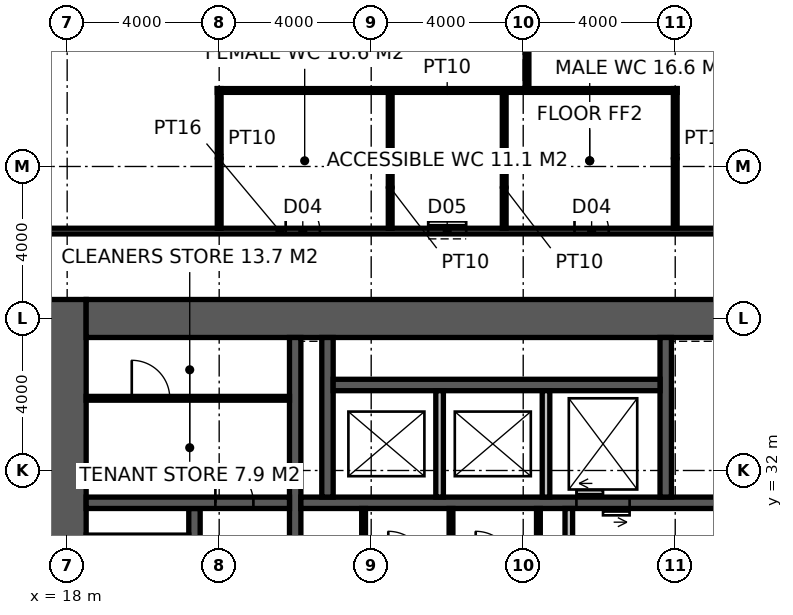
"""IFC4 building model, lengths in metres.
Left out: names, types, materials, properties, quantities, classifications, styles, units other than length and angle.
Written with IfcOpenShell. Run it as: python <this file> out.ifc"""

import sys

from ifc_helpers import new_model, si_unit, direction, frame, frame_2d, origin, place, context, subcontext, project, spatial, rectangle, extrude, element, fill, save


model = new_model("IFC4")
c1 = context("Model", 3, precision=1e-05, world=origin(), true_north=direction((0.0, 1.0)))
c2 = subcontext(c1, "Body", "Model", "MODEL_VIEW")
j1 = project(units=[si_unit("LENGTHUNIT", "METRE"), si_unit("PLANEANGLEUNIT", "RADIAN")], contexts=[c1])
p1 = place(None, origin())
s1 = spatial("IfcSite", under=j1, at=p1, CompositionType="ELEMENT")
p2 = place(p1, origin())
s2 = spatial("IfcBuilding", under=s1, at=p2, CompositionType="ELEMENT")
p3 = place(p2, frame((0.0, 0.0, 199.8)))
s3 = spatial("IfcBuildingStorey", under=s2, at=p3, CompositionType="ELEMENT", Elevation=199.8)
p4 = place(p3, frame((18.0, 17.5, -0.15), z_axis=(0.0, 0.0, 1.0), x_axis=(0.0, 1.0, 0.0)))
e1 = element("IfcWall", 1, at=p4, inside=s3, PredefinedType="SHEAR", context=c2, shape_type="SweptSolid", body=[
    extrude(rectangle(XDim=19.0, YDim=1.0, at=frame_2d((9.5, 0.0))), origin(), (0.0, 0.0, 1.0), 4.0),
])
p5 = place(p3, frame((18.5, 36.0, -0.15), z_axis=(0.0, 0.0, 1.0), x_axis=(1.0, 0.0, 0.0)))
e2 = element("IfcWall", 2, at=p5, inside=s3, PredefinedType="SHEAR", context=c2, shape_type="SweptSolid", body=[
    extrude(rectangle(XDim=17.6, YDim=1.0, at=frame_2d((8.8, 0.0))), origin(), (0.0, 0.0, 1.0), 4.0),
])
p6 = place(p3, frame((24.0, 18.5, -0.15), z_axis=(0.0, 0.0, 1.0), x_axis=(0.0, 1.0, 0.0)))
e3 = element("IfcWall", 3, at=p6, inside=s3, PredefinedType="SHEAR", context=c2, shape_type="SweptSolid", body=[
    extrude(rectangle(XDim=17.0, YDim=0.3, at=frame_2d((8.5, 0.0))), origin(), (0.0, 0.0, 1.0), 4.0),
])
p7 = place(p6, frame((9.6, 0.0, 0.15)))
e4 = element("IfcOpeningElement", 4, at=p7, cuts=e3, PredefinedType="OPENING", context=c2, shape_type="SweptSolid", body=[
    extrude(rectangle(XDim=1.5, YDim=2.4, at=frame_2d((0.75, 1.2))), frame((0.0, 0.16, 0.0), z_axis=(0.0, -1.0, 0.0), x_axis=(1.0, 0.0, 0.0)), (0.0, 0.0, 1.0), 0.32),
])
p8 = place(p3, frame((24.15, 31.15, -0.15), z_axis=(0.0, 0.0, 1.0), x_axis=(1.0, 0.0, 0.0)))
e5 = element("IfcWall", 5, at=p8, inside=s3, PredefinedType="SHEAR", context=c2, shape_type="SweptSolid", body=[
    extrude(rectangle(XDim=11.25, YDim=0.3, at=frame_2d((5.625, 0.0))), origin(), (0.0, 0.0, 1.0), 4.0),
])
p9 = place(p8, frame((7.25, 0.0, 0.15)))
e6 = element("IfcOpeningElement", 6, at=p9, cuts=e5, PredefinedType="OPENING", context=c2, shape_type="SweptSolid", body=[
    extrude(rectangle(XDim=1.4, YDim=2.4, at=frame_2d((0.7, 1.2))), frame((0.0, 0.16, 0.0), z_axis=(0.0, -1.0, 0.0), x_axis=(1.0, 0.0, 0.0)), (0.0, 0.0, 1.0), 0.32),
])
p10 = place(p3, frame((21.35, 18.5, -0.15), z_axis=(0.0, 0.0, 1.0), x_axis=(0.0, 1.0, 0.0)))
e7 = element("IfcWall", 7, at=p10, inside=s3, PredefinedType="SHEAR", context=c2, shape_type="SweptSolid", body=[
    extrude(rectangle(XDim=12.5, YDim=0.3, at=frame_2d((6.25, 0.0))), origin(), (0.0, 0.0, 1.0), 4.0),
])
p11 = place(p10, frame((0.875, 0.0, 0.15)))
e8 = element("IfcOpeningElement", 8, at=p11, cuts=e7, PredefinedType="OPENING", context=c2, shape_type="SweptSolid", body=[
    extrude(rectangle(XDim=1.1, YDim=2.2, at=frame_2d((0.55, 1.1))), frame((0.0, 0.16, 0.0), z_axis=(0.0, -1.0, 0.0), x_axis=(1.0, 0.0, 0.0)), (0.0, 0.0, 1.0), 0.32),
])
p12 = place(p10, frame((3.825, 0.0, 0.15)))
e9 = element("IfcOpeningElement", 9, at=p12, cuts=e7, PredefinedType="OPENING", context=c2, shape_type="SweptSolid", body=[
    extrude(rectangle(XDim=1.1, YDim=2.2, at=frame_2d((0.55, 1.1))), frame((0.0, 0.16, 0.0), z_axis=(0.0, -1.0, 0.0), x_axis=(1.0, 0.0, 0.0)), (0.0, 0.0, 1.0), 0.32),
])
p13 = place(p10, frame((6.675, 0.0, 0.15)))
e10 = element("IfcOpeningElement", 10, at=p13, cuts=e7, PredefinedType="OPENING", context=c2, shape_type="SweptSolid", body=[
    extrude(rectangle(XDim=1.1, YDim=2.2, at=frame_2d((0.55, 1.1))), frame((0.0, 0.16, 0.0), z_axis=(0.0, -1.0, 0.0), x_axis=(1.0, 0.0, 0.0)), (0.0, 0.0, 1.0), 0.32),
])
p14 = place(p10, frame((9.575, 0.0, 0.15)))
e11 = element("IfcOpeningElement", 11, at=p14, cuts=e7, PredefinedType="OPENING", context=c2, shape_type="SweptSolid", body=[
    extrude(rectangle(XDim=1.1, YDim=2.2, at=frame_2d((0.55, 1.1))), frame((0.0, 0.16, 0.0), z_axis=(0.0, -1.0, 0.0), x_axis=(1.0, 0.0, 0.0)), (0.0, 0.0, 1.0), 0.32),
])
p15 = place(p3, frame((18.5, 31.15, -0.15), z_axis=(0.0, 0.0, 1.0), x_axis=(1.0, 0.0, 0.0)))
e12 = element("IfcWall", 12, at=p15, inside=s3, PredefinedType="SHEAR", context=c2, shape_type="SweptSolid", body=[
    extrude(rectangle(XDim=5.35, YDim=0.3, at=frame_2d((2.675, 0.0))), origin(), (0.0, 0.0, 1.0), 4.0),
])
p16 = place(p15, frame((3.4, 0.0, 0.15)))
e13 = element("IfcOpeningElement", 13, at=p16, cuts=e12, PredefinedType="OPENING", context=c2, shape_type="SweptSolid", body=[
    extrude(rectangle(XDim=1.0, YDim=2.2, at=frame_2d((0.5, 1.1))), frame((0.0, 0.16, 0.0), z_axis=(0.0, -1.0, 0.0), x_axis=(1.0, 0.0, 0.0)), (0.0, 0.0, 1.0), 0.32),
])
for number, where, z_axis, x_axis in (
    (14, (24.85, 31.3, -0.15), (0.0, 0.0, 1.0), (0.0, 1.0, 0.0)),
    (15, (33.75, 31.3, -0.15), (0.0, 0.0, 1.0), (0.0, 1.0, 0.0)),
):
    element("IfcWall", number, at=place(p3, frame(where, z_axis=z_axis, x_axis=x_axis)), inside=s3, PredefinedType="SHEAR", context=c2, shape_type="SweptSolid", body=[
        extrude(rectangle(XDim=4.2, YDim=0.3, at=frame_2d((2.1, 0.0))), origin(), (0.0, 0.0, 1.0), 4.0),
    ])
p17 = place(p3, frame((25.0, 34.25, -0.15), z_axis=(0.0, 0.0, 1.0), x_axis=(1.0, 0.0, 0.0)))
e16 = element("IfcWall", 16, at=p17, inside=s3, PredefinedType="SHEAR", context=c2, shape_type="SweptSolid", body=[
    extrude(rectangle(XDim=8.6, YDim=0.3, at=frame_2d((4.3, 0.0))), origin(), (0.0, 0.0, 1.0), 4.0),
])
for number, where, z_axis, x_axis in (
    (17, (27.8, 31.3, -0.15), (0.0, 0.0, 1.0), (0.0, 1.0, 0.0)),
    (18, (30.6, 31.3, -0.15), (0.0, 0.0, 1.0), (0.0, 1.0, 0.0)),
):
    element("IfcWall", number, at=place(p3, frame(where, z_axis=z_axis, x_axis=x_axis)), inside=s3, PredefinedType="SOLIDWALL", context=c2, shape_type="SweptSolid", body=[
        extrude(rectangle(XDim=2.8, YDim=0.2, at=frame_2d((1.4, 0.0))), origin(), (0.0, 0.0, 1.0), 4.0),
    ])
p18 = place(p3, frame((31.2, 26.7, 0.0), z_axis=(0.0, 0.0, 1.0), x_axis=(0.0, 1.0, 0.0)))
e19 = element("IfcWall", 19, at=p18, inside=s3, PredefinedType="SOLIDWALL", context=c2, shape_type="SweptSolid", body=[
    extrude(rectangle(XDim=4.3, YDim=0.2, at=frame_2d((2.15, 0.0))), origin(), (0.0, 0.0, 1.0), 3.85),
])
p19 = place(p3, frame((18.5, 33.9, 0.0), z_axis=(0.0, 0.0, 1.0), x_axis=(1.0, 0.0, 0.0)))
e20 = element("IfcWall", 20, at=p19, inside=s3, PredefinedType="PARTITIONING", context=c2, shape_type="SweptSolid", body=[
    extrude(rectangle(XDim=5.35, YDim=0.1, at=frame_2d((2.675, 0.0))), origin(), (0.0, 0.0, 1.0), 3.85),
])
p20 = place(p19, frame((1.2, 0.0, 0.0)))
e21 = element("IfcOpeningElement", 21, at=p20, cuts=e20, PredefinedType="OPENING", context=c2, shape_type="SweptSolid", body=[
    extrude(rectangle(XDim=1.0, YDim=2.2, at=frame_2d((0.5, 1.1))), frame((0.0, 0.06, 0.0), z_axis=(0.0, -1.0, 0.0), x_axis=(1.0, 0.0, 0.0)), (0.0, 0.0, 1.0), 0.12),
])
for number, where, z_axis, x_axis in (
    (22, (25.8, 29.45, 0.0), (0.0, 0.0, 1.0), (0.0, 1.0, 0.0)),
    (23, (30.4, 29.45, 0.0), (0.0, 0.0, 1.0), (0.0, 1.0, 0.0)),
    (24, (28.1, 29.45, 0.0), (0.0, 0.0, 1.0), (0.0, 1.0, 0.0)),
):
    element("IfcWall", number, at=place(p3, frame(where, z_axis=z_axis, x_axis=x_axis)), inside=s3, PredefinedType="PARTITIONING", context=c2, shape_type="SweptSolid", body=[
        extrude(rectangle(XDim=1.55, YDim=0.1, at=frame_2d((0.775, 0.0))), origin(), (0.0, 0.0, 1.0), 3.85),
    ])
p21 = place(p3, frame((17.5, 38.3, 0.0), z_axis=(0.0, 0.0, 1.0), x_axis=(1.0, 0.0, 0.0)))
e25 = element("IfcWall", 25, at=p21, inside=s3, PredefinedType="PARTITIONING", context=c2, shape_type="SweptSolid", body=[
    extrude(rectangle(XDim=20.325, YDim=0.15, at=frame_2d((10.163, 0.0))), origin(), (0.0, 0.0, 1.0), 3.85),
])
p22 = place(p21, frame((6.25, 0.0, 0.0)))
e26 = element("IfcOpeningElement", 26, at=p22, cuts=e25, PredefinedType="OPENING", context=c2, shape_type="SweptSolid", body=[
    extrude(rectangle(XDim=0.9, YDim=2.1, at=frame_2d((0.45, 1.05))), frame((0.0, 0.085, 0.0), z_axis=(0.0, -1.0, 0.0), x_axis=(1.0, 0.0, 0.0)), (0.0, 0.0, 1.0), 0.17),
])
p23 = place(p21, frame((10.0, 0.0, 0.0)))
e27 = element("IfcOpeningElement", 27, at=p23, cuts=e25, PredefinedType="OPENING", context=c2, shape_type="SweptSolid", body=[
    extrude(rectangle(XDim=1.0, YDim=2.1, at=frame_2d((0.5, 1.05))), frame((0.0, 0.085, 0.0), z_axis=(0.0, -1.0, 0.0), x_axis=(1.0, 0.0, 0.0)), (0.0, 0.0, 1.0), 0.17),
])
p24 = place(p21, frame((13.85, 0.0, 0.0)))
e28 = element("IfcOpeningElement", 28, at=p24, cuts=e25, PredefinedType="OPENING", context=c2, shape_type="SweptSolid", body=[
    extrude(rectangle(XDim=0.9, YDim=2.1, at=frame_2d((0.45, 1.05))), frame((0.0, 0.085, 0.0), z_axis=(0.0, -1.0, 0.0), x_axis=(1.0, 0.0, 0.0)), (0.0, 0.0, 1.0), 0.17),
])
for number, where, z_axis, x_axis in (
    (29, (22.0, 38.375, 0.0), (0.0, 0.0, 1.0), (0.0, 1.0, 0.0)),
    (30, (34.0, 38.375, 0.0), (0.0, 0.0, 1.0), (0.0, 1.0, 0.0)),
):
    element("IfcWall", number, at=place(p3, frame(where, z_axis=z_axis, x_axis=x_axis)), inside=s3, PredefinedType="PARTITIONING", context=c2, shape_type="SweptSolid", body=[
        extrude(rectangle(XDim=3.675, YDim=0.1, at=frame_2d((1.837, 0.0))), origin(), (0.0, 0.0, 1.0), 2.85),
    ])
p25 = place(p3, frame((21.95, 42.0, 0.0), z_axis=(0.0, 0.0, 1.0), x_axis=(1.0, 0.0, 0.0)))
e31 = element("IfcWall", 31, at=p25, inside=s3, PredefinedType="PARTITIONING", context=c2, shape_type="SweptSolid", body=[
    extrude(rectangle(XDim=12.1, YDim=0.1, at=frame_2d((6.05, 0.0))), origin(), (0.0, 0.0, 1.0), 3.85),
])
for number, where, z_axis, x_axis in (
    (32, (26.5, 38.375, 0.0), (0.0, 0.0, 1.0), (0.0, 1.0, 0.0)),
    (33, (29.5, 38.375, 0.0), (0.0, 0.0, 1.0), (0.0, 1.0, 0.0)),
):
    element("IfcWall", number, at=place(p3, frame(where, z_axis=z_axis, x_axis=x_axis)), inside=s3, PredefinedType="PARTITIONING", context=c2, shape_type="SweptSolid", body=[
        extrude(rectangle(XDim=3.575, YDim=0.1, at=frame_2d((1.788, 0.0))), origin(), (0.0, 0.0, 1.0), 2.65),
    ])
p26 = place(p3, frame((30.1, 55.7, 0.0), z_axis=(0.0, 0.0, 1.0), x_axis=(0.0, -1.0, 0.0)))
e34 = element("IfcWall", 34, at=p26, inside=s3, PredefinedType="PARTITIONING", context=c2, shape_type="SweptSolid", body=[
    extrude(rectangle(XDim=13.7, YDim=0.1, at=frame_2d((6.85, 0.0))), origin(), (0.0, 0.0, 1.0), 2.65),
])
p27 = place(p26, frame((6.35, 0.0, 0.0)))
e35 = element("IfcOpeningElement", 35, at=p27, cuts=e34, PredefinedType="OPENING", context=c2, shape_type="SweptSolid", body=[
    extrude(rectangle(XDim=1.0, YDim=2.2, at=frame_2d((0.5, 1.1))), frame((0.0, 0.06, 0.0), z_axis=(0.0, -1.0, 0.0), x_axis=(1.0, 0.0, 0.0)), (0.0, 0.0, 1.0), 0.12),
])
p28 = place(p16, origin())
e36 = element("IfcDoor", 36, at=p28, inside=s3, OperationType="SINGLE_SWING_LEFT", PredefinedType="DOOR", context=c2, shape_type="SweptSolid", body=[
    extrude(rectangle(XDim=1.0, YDim=2.2, at=frame_2d((0.5, 1.1))), frame((0.0, 0.025, 0.0), z_axis=(0.0, -1.0, 0.0), x_axis=(1.0, 0.0, 0.0)), (0.0, 0.0, 1.0), 0.05),
])
fill(e13, e36)
p29 = place(p20, origin())
e37 = element("IfcDoor", 37, at=p29, inside=s3, OperationType="SINGLE_SWING_LEFT", PredefinedType="DOOR", context=c2, shape_type="SweptSolid", body=[
    extrude(rectangle(XDim=1.0, YDim=2.2, at=frame_2d((0.5, 1.1))), frame((0.0, 0.025, 0.0), z_axis=(0.0, -1.0, 0.0), x_axis=(1.0, 0.0, 0.0)), (0.0, 0.0, 1.0), 0.05),
])
fill(e21, e37)
p30 = place(p22, origin())
e38 = element("IfcDoor", 38, at=p30, inside=s3, OperationType="SINGLE_SWING_LEFT", PredefinedType="DOOR", context=c2, shape_type="SweptSolid", body=[
    extrude(rectangle(XDim=0.9, YDim=2.1, at=frame_2d((0.45, 1.05))), frame((0.0, 0.025, 0.0), z_axis=(0.0, -1.0, 0.0), x_axis=(1.0, 0.0, 0.0)), (0.0, 0.0, 1.0), 0.05),
])
fill(e26, e38)
p31 = place(p23, origin())
e39 = element("IfcDoor", 39, at=p31, inside=s3, OperationType="SLIDING_TO_LEFT", PredefinedType="DOOR", context=c2, shape_type="SweptSolid", body=[
    extrude(rectangle(XDim=1.0, YDim=2.1, at=frame_2d((0.5, 1.05))), frame((0.0, 0.025, 0.0), z_axis=(0.0, -1.0, 0.0), x_axis=(1.0, 0.0, 0.0)), (0.0, 0.0, 1.0), 0.05),
])
fill(e27, e39)
p32 = place(p24, origin())
e40 = element("IfcDoor", 40, at=p32, inside=s3, OperationType="SINGLE_SWING_LEFT", PredefinedType="DOOR", context=c2, shape_type="SweptSolid", body=[
    extrude(rectangle(XDim=0.9, YDim=2.1, at=frame_2d((0.45, 1.05))), frame((0.0, 0.025, 0.0), z_axis=(0.0, -1.0, 0.0), x_axis=(1.0, 0.0, 0.0)), (0.0, 0.0, 1.0), 0.05),
])
fill(e28, e40)
p33 = place(p9, origin())
e41 = element("IfcDoor", 41, at=p33, inside=s3, OperationType="DOUBLE_DOOR_SLIDING", PredefinedType="DOOR", context=c2, shape_type="SweptSolid", body=[
    extrude(rectangle(XDim=1.4, YDim=2.4, at=frame_2d((0.7, 1.2))), frame((0.0, 0.025, 0.0), z_axis=(0.0, -1.0, 0.0), x_axis=(1.0, 0.0, 0.0)), (0.0, 0.0, 1.0), 0.05),
])
fill(e6, e41)
save(model, sys.argv[1])
